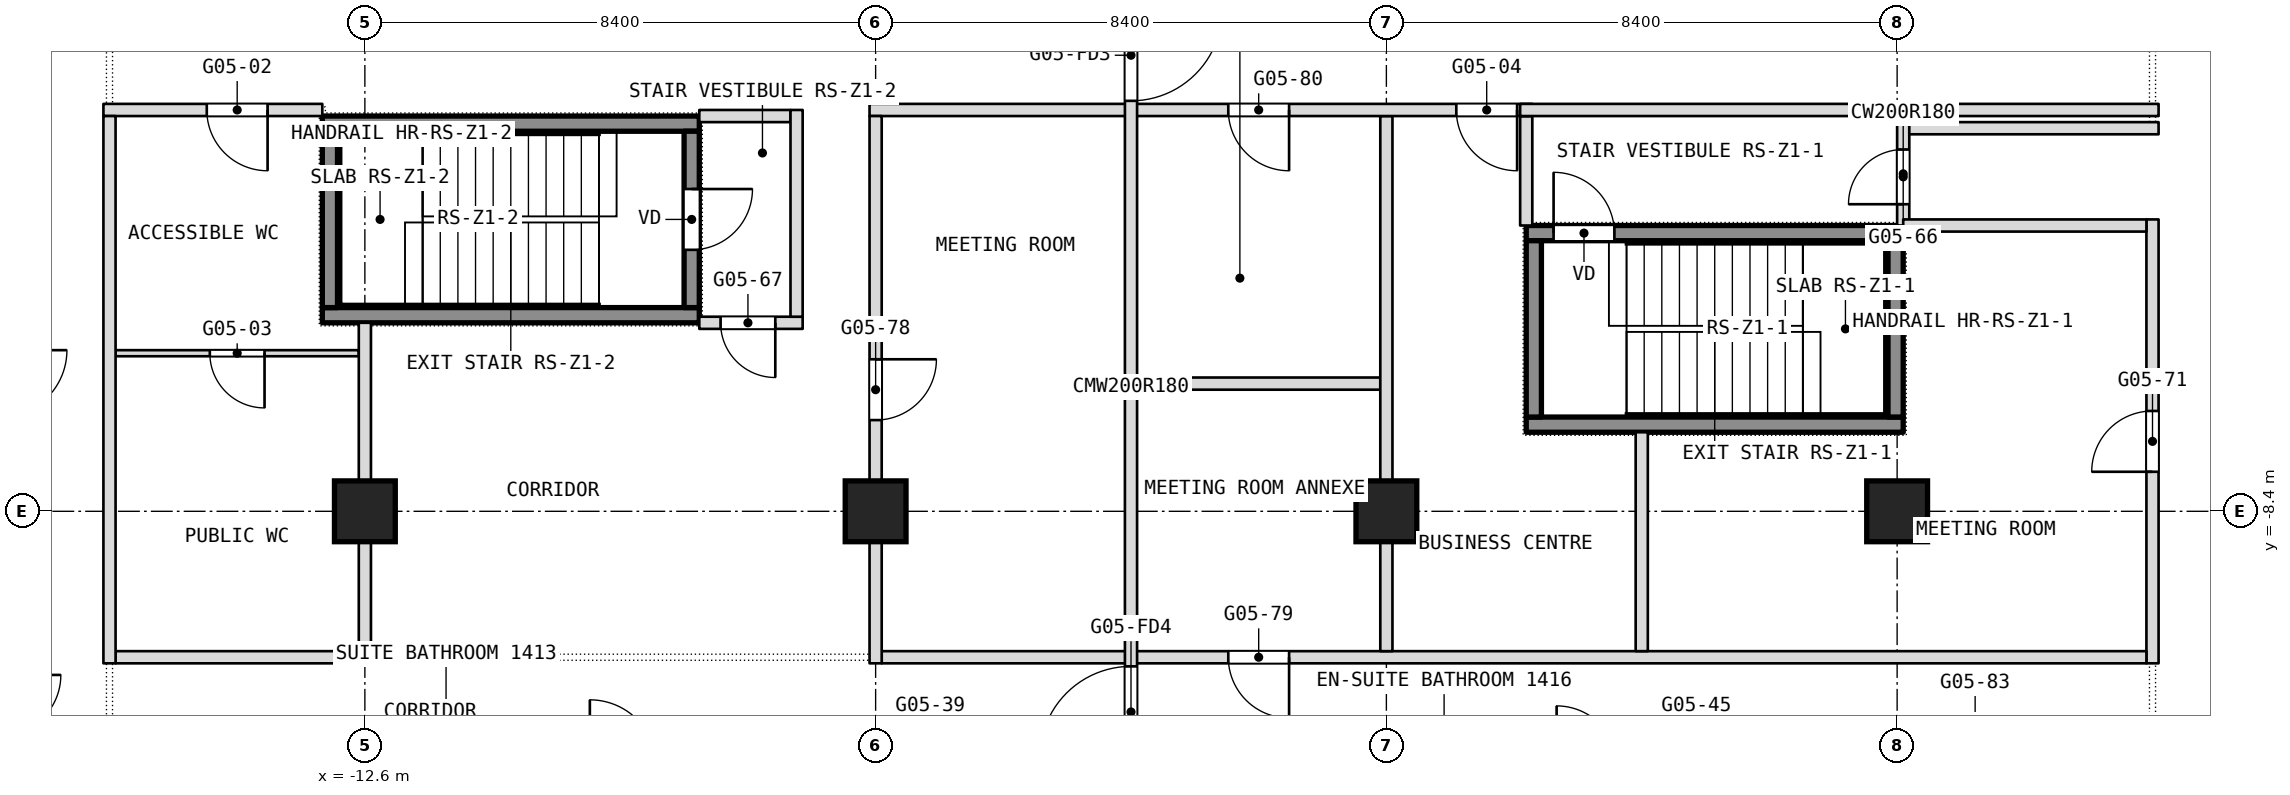
"""IFC4 building model, lengths in metres.
Left out: names, types, materials, properties, quantities, classifications, styles, units other than length and angle.
Written with IfcOpenShell. Run it as: python <this file> out.ifc"""

import sys

from ifc_helpers import new_model, si_unit, direction, frame, frame_2d, origin, origin_2d, place, context, subcontext, project, spatial, rectangle, extrude, element, fill, save


model = new_model("IFC4")
c1 = context("Model", 3, precision=1e-05, world=origin(), true_north=direction((0.0, 1.0)))
c2 = subcontext(c1, "Body", "Model", "MODEL_VIEW")
j1 = project(units=[si_unit("LENGTHUNIT", "METRE"), si_unit("PLANEANGLEUNIT", "RADIAN")], contexts=[c1])
p1 = place(None, origin())
s1 = spatial("IfcSite", under=j1, at=p1, CompositionType="ELEMENT")
p2 = place(p1, origin())
s2 = spatial("IfcBuilding", under=s1, at=p2, CompositionType="ELEMENT")
p3 = place(p2, frame((0.0, 0.0, 65.3)))
s3 = spatial("IfcBuildingStorey", under=s2, at=p3, CompositionType="ELEMENT", Elevation=65.3)
for number, where, z_axis, x_axis in (
    (1, (-12.6, -8.4, 0.0), (0.0, 0.0, 1.0), (1.0, 0.0, 0.0)),
    (2, (-4.2, -8.4, 0.0), (0.0, 0.0, 1.0), (1.0, 0.0, 0.0)),
    (3, (4.2, -8.4, 0.0), (0.0, 0.0, 1.0), (1.0, 0.0, 0.0)),
    (4, (12.6, -8.4, 0.0), (0.0, 0.0, 1.0), (1.0, 0.0, 0.0)),
):
    element("IfcColumn", number, at=place(p3, frame(where, z_axis=z_axis, x_axis=x_axis)), inside=s3, PredefinedType="COLUMN", context=c2, shape_type="SweptSolid", body=[
        extrude(rectangle(XDim=1.0, YDim=1.0, at=origin_2d()), origin(), (0.0, 0.0, 1.0), 3.6),
    ])
p4 = place(p3, frame((16.8, -10.9, 0.0), z_axis=(0.0, 0.0, 1.0), x_axis=(0.0, 1.0, 0.0)))
e5 = element("IfcWall", 5, at=p4, inside=s3, PredefinedType="PARTITIONING", context=c2, shape_type="SweptSolid", body=[
    extrude(rectangle(XDim=7.3, YDim=0.2, at=frame_2d((3.65, 0.0))), origin(), (0.0, 0.0, 1.0), 3.34),
])
p5 = place(p4, frame((3.15, 0.0, 0.0)))
e6 = element("IfcOpeningElement", 6, at=p5, cuts=e5, PredefinedType="OPENING", context=c2, shape_type="SweptSolid", body=[
    extrude(rectangle(XDim=1.0, YDim=2.1, at=frame_2d((0.5, 1.05))), frame((0.0, 0.1, 0.0), z_axis=(0.0, -1.0, 0.0), x_axis=(1.0, 0.0, 0.0)), (0.0, 0.0, 1.0), 0.2),
])
p6 = place(p3, frame((12.7, -3.7, 0.0), z_axis=(0.0, 0.0, 1.0), x_axis=(0.0, 1.0, 0.0)))
e7 = element("IfcWall", 7, at=p6, inside=s3, PredefinedType="PARTITIONING", context=c2, shape_type="SweptSolid", body=[
    extrude(rectangle(XDim=1.7, YDim=0.2, at=frame_2d((0.85, 0.0))), origin(), (0.0, 0.0, 1.0), 3.34),
])
p7 = place(p6, frame((0.35, 0.0, 0.0)))
e8 = element("IfcOpeningElement", 8, at=p7, cuts=e7, PredefinedType="OPENING", context=c2, shape_type="SweptSolid", body=[
    extrude(rectangle(XDim=0.9, YDim=2.1, at=frame_2d((0.45, 1.05))), frame((0.0, 0.1, 0.0), z_axis=(0.0, -1.0, 0.0), x_axis=(1.0, 0.0, 0.0)), (0.0, 0.0, 1.0), 0.2),
])
p8 = place(p3, frame((-16.7, -10.8, 0.0), z_axis=(0.0, 0.0, 1.0), x_axis=(1.0, 0.0, 0.0)))
e9 = element("IfcWall", 9, at=p8, inside=s3, PredefinedType="PARTITIONING", context=c2, shape_type="SweptSolid", body=[
    extrude(rectangle(XDim=4.0, YDim=0.2, at=frame_2d((2.0, 0.0))), origin(), (0.0, 0.0, 1.0), 3.34),
])
p9 = place(p3, frame((-4.1, -10.8, 0.0), z_axis=(0.0, 0.0, 1.0), x_axis=(1.0, 0.0, 0.0)))
e10 = element("IfcWall", 10, at=p9, inside=s3, PredefinedType="PARTITIONING", context=c2, shape_type="SweptSolid", body=[
    extrude(rectangle(XDim=20.8, YDim=0.2, at=frame_2d((10.4, 0.0))), origin(), (0.0, 0.0, 1.0), 3.34),
])
p10 = place(p9, frame((5.7, 0.0, 0.0)))
e11 = element("IfcOpeningElement", 11, at=p10, cuts=e10, PredefinedType="OPENING", context=c2, shape_type="SweptSolid", body=[
    extrude(rectangle(XDim=1.0, YDim=2.1, at=frame_2d((0.5, 1.05))), frame((0.0, 0.1, 0.0), z_axis=(0.0, -1.0, 0.0), x_axis=(1.0, 0.0, 0.0)), (0.0, 0.0, 1.0), 0.2),
])
p11 = place(p3, frame((8.4, -10.7, 0.0), z_axis=(0.0, 0.0, 1.0), x_axis=(0.0, 1.0, 0.0)))
e12 = element("IfcWall", 12, at=p11, inside=s3, PredefinedType="PARTITIONING", context=c2, shape_type="SweptSolid", body=[
    extrude(rectangle(XDim=3.6, YDim=0.2, at=frame_2d((1.8, 0.0))), origin(), (0.0, 0.0, 1.0), 3.34),
])
p12 = place(p3, frame((6.5, -3.7, 0.0), z_axis=(0.0, 0.0, 1.0), x_axis=(0.0, 1.0, 0.0)))
e13 = element("IfcWall", 13, at=p12, inside=s3, PredefinedType="PARTITIONING", context=c2, shape_type="SweptSolid", body=[
    extrude(rectangle(XDim=1.8, YDim=0.2, at=frame_2d((0.9, 0.0))), origin(), (0.0, 0.0, 1.0), 3.34),
])
p13 = place(p3, frame((0.1, -6.3, 0.0), z_axis=(0.0, 0.0, 1.0), x_axis=(1.0, 0.0, 0.0)))
e14 = element("IfcWall", 14, at=p13, inside=s3, PredefinedType="PARTITIONING", context=c2, shape_type="SweptSolid", body=[
    extrude(rectangle(XDim=4.0, YDim=0.2, at=frame_2d((2.0, 0.0))), origin(), (0.0, 0.0, 1.0), 3.34),
])
p14 = place(p3, frame((-16.7, -5.8, 0.0), z_axis=(0.0, 0.0, 1.0), x_axis=(1.0, 0.0, 0.0)))
e15 = element("IfcWall", 15, at=p14, inside=s3, PredefinedType="PARTITIONING", context=c2, shape_type="SweptSolid", body=[
    extrude(rectangle(XDim=4.0, YDim=0.1, at=frame_2d((2.0, 0.0))), origin(), (0.0, 0.0, 1.0), 3.34),
])
p15 = place(p14, frame((1.55, 0.0, 0.0)))
e16 = element("IfcOpeningElement", 16, at=p15, cuts=e15, PredefinedType="OPENING", context=c2, shape_type="SweptSolid", body=[
    extrude(rectangle(XDim=0.9, YDim=2.1, at=frame_2d((0.45, 1.05))), frame((0.0, 0.05, 0.0), z_axis=(0.0, -1.0, 0.0), x_axis=(1.0, 0.0, 0.0)), (0.0, 0.0, 1.0), 0.1),
])
p16 = place(p3, frame((-7.1, -5.3, 0.0), z_axis=(0.0, 0.0, 1.0), x_axis=(1.0, 0.0, 0.0)))
e17 = element("IfcWall", 17, at=p16, inside=s3, PredefinedType="PARTITIONING", context=c2, shape_type="SweptSolid", body=[
    extrude(rectangle(XDim=1.7, YDim=0.2, at=frame_2d((0.85, 0.0))), origin(), (0.0, 0.0, 1.0), 3.34),
])
p17 = place(p16, frame((0.35, 0.0, 0.0)))
e18 = element("IfcOpeningElement", 18, at=p17, cuts=e17, PredefinedType="OPENING", context=c2, shape_type="SweptSolid", body=[
    extrude(rectangle(XDim=0.9, YDim=2.1, at=frame_2d((0.45, 1.05))), frame((0.0, 0.1, 0.0), z_axis=(0.0, -1.0, 0.0), x_axis=(1.0, 0.0, 0.0)), (0.0, 0.0, 1.0), 0.2),
])
p18 = place(p3, frame((4.2, -10.7, 0.0), z_axis=(0.0, 0.0, 1.0), x_axis=(0.0, 1.0, 0.0)))
e19 = element("IfcWall", 19, at=p18, inside=s3, PredefinedType="PARTITIONING", context=c2, shape_type="SweptSolid", body=[
    extrude(rectangle(XDim=8.8, YDim=0.2, at=frame_2d((4.4, 0.0))), origin(), (0.0, 0.0, 1.0), 3.34),
])
p19 = place(p3, frame((12.7, -3.7, 0.0), z_axis=(0.0, 0.0, 1.0), x_axis=(1.0, 0.0, 0.0)))
e20 = element("IfcWall", 20, at=p19, inside=s3, PredefinedType="PARTITIONING", context=c2, shape_type="SweptSolid", body=[
    extrude(rectangle(XDim=4.0, YDim=0.2, at=frame_2d((2.0, 0.0))), origin(), (0.0, 0.0, 1.0), 3.34),
])
p20 = place(p3, frame((12.8, -2.1, 0.0), z_axis=(0.0, 0.0, 1.0), x_axis=(1.0, 0.0, 0.0)))
e21 = element("IfcWall", 21, at=p20, inside=s3, PredefinedType="PARTITIONING", context=c2, shape_type="SweptSolid", body=[
    extrude(rectangle(XDim=4.1, YDim=0.2, at=frame_2d((2.05, 0.0))), origin(), (0.0, 0.0, 1.0), 3.34),
])
p21 = place(p3, frame((-7.1, -1.9, 0.0), z_axis=(0.0, 0.0, 1.0), x_axis=(1.0, 0.0, 0.0)))
e22 = element("IfcWall", 22, at=p21, inside=s3, PredefinedType="PARTITIONING", context=c2, shape_type="SweptSolid", body=[
    extrude(rectangle(XDim=1.5, YDim=0.2, at=frame_2d((0.75, 0.0))), origin(), (0.0, 0.0, 1.0), 3.34),
])
p22 = place(p3, frame((-16.9, -1.8, 0.0), z_axis=(0.0, 0.0, 1.0), x_axis=(1.0, 0.0, 0.0)))
e23 = element("IfcWall", 23, at=p22, inside=s3, PredefinedType="PARTITIONING", context=c2, shape_type="SweptSolid", body=[
    extrude(rectangle(XDim=3.6, YDim=0.2, at=frame_2d((1.8, 0.0))), origin(), (0.0, 0.0, 1.0), 3.34),
])
p23 = place(p22, frame((1.7, 0.0, 0.0)))
e24 = element("IfcOpeningElement", 24, at=p23, cuts=e23, PredefinedType="OPENING", context=c2, shape_type="SweptSolid", body=[
    extrude(rectangle(XDim=1.0, YDim=2.1, at=frame_2d((0.5, 1.05))), frame((0.0, 0.1, 0.0), z_axis=(0.0, -1.0, 0.0), x_axis=(1.0, 0.0, 0.0)), (0.0, 0.0, 1.0), 0.2),
])
p24 = place(p3, frame((-4.3, -1.8, 0.0), z_axis=(0.0, 0.0, 1.0), x_axis=(1.0, 0.0, 0.0)))
e25 = element("IfcWall", 25, at=p24, inside=s3, PredefinedType="PARTITIONING", context=c2, shape_type="SweptSolid", body=[
    extrude(rectangle(XDim=10.9, YDim=0.2, at=frame_2d((5.45, 0.0))), origin(), (0.0, 0.0, 1.0), 3.34),
])
p25 = place(p24, frame((9.65, 0.0, 0.0)))
e26 = element("IfcOpeningElement", 26, at=p25, cuts=e25, PredefinedType="OPENING", context=c2, shape_type="SweptSolid", body=[
    extrude(rectangle(XDim=1.0, YDim=2.1, at=frame_2d((0.5, 1.05))), frame((0.0, 0.1, 0.0), z_axis=(0.0, -1.0, 0.0), x_axis=(1.0, 0.0, 0.0)), (0.0, 0.0, 1.0), 0.2),
])
p26 = place(p24, frame((5.9, 0.0, 0.0)))
e27 = element("IfcOpeningElement", 27, at=p26, cuts=e25, PredefinedType="OPENING", context=c2, shape_type="SweptSolid", body=[
    extrude(rectangle(XDim=1.0, YDim=2.1, at=frame_2d((0.5, 1.05))), frame((0.0, 0.1, 0.0), z_axis=(0.0, -1.0, 0.0), x_axis=(1.0, 0.0, 0.0)), (0.0, 0.0, 1.0), 0.2),
])
p27 = place(p3, frame((6.4, -1.8, 0.0), z_axis=(0.0, 0.0, 1.0), x_axis=(1.0, 0.0, 0.0)))
e28 = element("IfcWall", 28, at=p27, inside=s3, PredefinedType="PARTITIONING", context=c2, shape_type="SweptSolid", body=[
    extrude(rectangle(XDim=10.5, YDim=0.2, at=frame_2d((5.25, 0.0))), origin(), (0.0, 0.0, 1.0), 3.34),
])
p28 = place(p3, frame((0.0, -12.7, 0.0), z_axis=(0.0, 0.0, 1.0), x_axis=(0.0, 1.0, 0.0)))
e29 = element("IfcWall", 29, at=p28, inside=s3, PredefinedType="PARTITIONING", context=c2, shape_type="SweptSolid", body=[
    extrude(rectangle(XDim=12.7, YDim=0.2, at=frame_2d((6.35, 0.0))), origin(), (0.0, 0.0, 1.0), 3.34),
])
p29 = place(p28, frame((11.05, 0.0, 0.0)))
e30 = element("IfcOpeningElement", 30, at=p29, cuts=e29, PredefinedType="OPENING", context=c2, shape_type="SweptSolid", body=[
    extrude(rectangle(XDim=1.5, YDim=2.1, at=frame_2d((0.75, 1.05))), frame((0.0, 0.1, 0.0), z_axis=(0.0, -1.0, 0.0), x_axis=(1.0, 0.0, 0.0)), (0.0, 0.0, 1.0), 0.2),
])
p30 = place(p28, frame((0.25, 0.0, 0.0)))
e31 = element("IfcOpeningElement", 31, at=p30, cuts=e29, PredefinedType="OPENING", context=c2, shape_type="SweptSolid", body=[
    extrude(rectangle(XDim=1.5, YDim=2.1, at=frame_2d((0.75, 1.05))), frame((0.0, 0.1, 0.0), z_axis=(0.0, -1.0, 0.0), x_axis=(1.0, 0.0, 0.0)), (0.0, 0.0, 1.0), 0.2),
])
p31 = place(p3, frame((-4.2, -10.9, 0.0), z_axis=(0.0, 0.0, 1.0), x_axis=(0.0, 1.0, 0.0)))
e32 = element("IfcWall", 32, at=p31, inside=s3, PredefinedType="PARTITIONING", context=c2, shape_type="SweptSolid", body=[
    extrude(rectangle(XDim=9.0, YDim=0.2, at=frame_2d((4.5, 0.0))), origin(), (0.0, 0.0, 1.0), 3.34),
])
p32 = place(p31, frame((4.0, 0.0, 0.0)))
e33 = element("IfcOpeningElement", 33, at=p32, cuts=e32, PredefinedType="OPENING", context=c2, shape_type="SweptSolid", body=[
    extrude(rectangle(XDim=1.0, YDim=2.1, at=frame_2d((0.5, 1.05))), frame((0.0, 0.1, 0.0), z_axis=(0.0, -1.0, 0.0), x_axis=(1.0, 0.0, 0.0)), (0.0, 0.0, 1.0), 0.2),
])
p33 = place(p3, frame((-5.5, -5.2, 0.0), z_axis=(0.0, 0.0, 1.0), x_axis=(0.0, 1.0, 0.0)))
e34 = element("IfcWall", 34, at=p33, inside=s3, PredefinedType="PARTITIONING", context=c2, shape_type="SweptSolid", body=[
    extrude(rectangle(XDim=3.4, YDim=0.2, at=frame_2d((1.7, 0.0))), origin(), (0.0, 0.0, 1.0), 3.34),
])
p34 = place(p3, frame((-12.6, -10.9, 0.0), z_axis=(0.0, 0.0, 1.0), x_axis=(0.0, 1.0, 0.0)))
e35 = element("IfcWall", 35, at=p34, inside=s3, PredefinedType="PARTITIONING", context=c2, shape_type="SweptSolid", body=[
    extrude(rectangle(XDim=5.6, YDim=0.2, at=frame_2d((2.8, 0.0))), origin(), (0.0, 0.0, 1.0), 3.34),
])
p35 = place(p3, frame((-16.8, -10.9, 0.0), z_axis=(0.0, 0.0, 1.0), x_axis=(0.0, 1.0, 0.0)))
e36 = element("IfcWall", 36, at=p35, inside=s3, PredefinedType="PARTITIONING", context=c2, shape_type="SweptSolid", body=[
    extrude(rectangle(XDim=9.0, YDim=0.2, at=frame_2d((4.5, 0.0))), origin(), (0.0, 0.0, 1.0), 3.34),
])
p36 = place(p3, frame((6.5, -6.975, 0.1), z_axis=(0.0, 0.0, 1.0), x_axis=(1.0, 0.0, 0.0)))
e37 = element("IfcWall", 37, at=p36, inside=s3, PredefinedType="SHEAR", context=c2, shape_type="SweptSolid", body=[
    extrude(rectangle(XDim=6.2, YDim=0.25, at=frame_2d((3.1, 0.0))), origin(), (0.0, 0.0, 1.0), 3.6),
])
p37 = place(p3, frame((6.5, -3.825, 0.1), z_axis=(0.0, 0.0, 1.0), x_axis=(1.0, 0.0, 0.0)))
e38 = element("IfcWall", 38, at=p37, inside=s3, PredefinedType="SHEAR", context=c2, shape_type="SweptSolid", body=[
    extrude(rectangle(XDim=6.2, YDim=0.25, at=frame_2d((3.1, 0.0))), origin(), (0.0, 0.0, 1.0), 3.6),
])
p38 = place(p37, frame((0.45, 0.0, 0.0)))
e39 = element("IfcOpeningElement", 39, at=p38, cuts=e38, PredefinedType="OPENING", context=c2, shape_type="SweptSolid", body=[
    extrude(rectangle(XDim=1.0, YDim=2.1, at=frame_2d((0.5, 1.05))), frame((0.0, 0.125, 0.0), z_axis=(0.0, -1.0, 0.0), x_axis=(1.0, 0.0, 0.0)), (0.0, 0.0, 1.0), 0.25),
])
for number, where, z_axis, x_axis in (
    (40, (6.625, -6.85, 0.1), (0.0, 0.0, 1.0), (0.0, 1.0, 0.0)),
    (41, (12.575, -6.85, 0.1), (0.0, 0.0, 1.0), (0.0, 1.0, 0.0)),
):
    element("IfcWall", number, at=place(p3, frame(where, z_axis=z_axis, x_axis=x_axis)), inside=s3, PredefinedType="SHEAR", context=c2, shape_type="SweptSolid", body=[
        extrude(rectangle(XDim=2.9, YDim=0.25, at=frame_2d((1.45, 0.0))), origin(), (0.0, 0.0, 1.0), 3.6),
    ])
for number, where, z_axis, x_axis in (
    (42, (-13.3, -5.175, 0.1), (0.0, 0.0, 1.0), (1.0, 0.0, 0.0)),
    (43, (-13.3, -2.025, 0.1), (0.0, 0.0, 1.0), (1.0, 0.0, 0.0)),
):
    element("IfcWall", number, at=place(p3, frame(where, z_axis=z_axis, x_axis=x_axis)), inside=s3, PredefinedType="SHEAR", context=c2, shape_type="SweptSolid", body=[
        extrude(rectangle(XDim=6.2, YDim=0.25, at=frame_2d((3.1, 0.0))), origin(), (0.0, 0.0, 1.0), 3.6),
    ])
p39 = place(p3, frame((-13.175, -5.05, 0.1), z_axis=(0.0, 0.0, 1.0), x_axis=(0.0, 1.0, 0.0)))
e44 = element("IfcWall", 44, at=p39, inside=s3, PredefinedType="SHEAR", context=c2, shape_type="SweptSolid", body=[
    extrude(rectangle(XDim=2.9, YDim=0.25, at=frame_2d((1.45, 0.0))), origin(), (0.0, 0.0, 1.0), 3.6),
])
p40 = place(p3, frame((-7.225, -5.05, 0.1), z_axis=(0.0, 0.0, 1.0), x_axis=(0.0, 1.0, 0.0)))
e45 = element("IfcWall", 45, at=p40, inside=s3, PredefinedType="SHEAR", context=c2, shape_type="SweptSolid", body=[
    extrude(rectangle(XDim=2.9, YDim=0.25, at=frame_2d((1.45, 0.0))), origin(), (0.0, 0.0, 1.0), 3.6),
])
p41 = place(p40, frame((0.95, 0.0, 0.0)))
e46 = element("IfcOpeningElement", 46, at=p41, cuts=e45, PredefinedType="OPENING", context=c2, shape_type="SweptSolid", body=[
    extrude(rectangle(XDim=1.0, YDim=2.1, at=frame_2d((0.5, 1.05))), frame((0.0, 0.125, 0.0), z_axis=(0.0, -1.0, 0.0), x_axis=(1.0, 0.0, 0.0)), (0.0, 0.0, 1.0), 0.25),
])
p42 = place(p5, origin())
e47 = element("IfcDoor", 47, at=p42, inside=s3, OperationType="SINGLE_SWING_LEFT", PredefinedType="DOOR", context=c2, shape_type="SweptSolid", body=[
    extrude(rectangle(XDim=1.0, YDim=2.1, at=frame_2d((0.5, 1.05))), frame((0.0, 0.025, 0.0), z_axis=(0.0, -1.0, 0.0), x_axis=(1.0, 0.0, 0.0)), (0.0, 0.0, 1.0), 0.05),
])
fill(e6, e47)
p43 = place(p7, origin())
e48 = element("IfcDoor", 48, at=p43, inside=s3, OperationType="SINGLE_SWING_LEFT", PredefinedType="DOOR", context=c2, shape_type="SweptSolid", body=[
    extrude(rectangle(XDim=0.9, YDim=2.1, at=frame_2d((0.45, 1.05))), frame((0.0, 0.025, 0.0), z_axis=(0.0, -1.0, 0.0), x_axis=(1.0, 0.0, 0.0)), (0.0, 0.0, 1.0), 0.05),
])
fill(e8, e48)
p44 = place(p10, origin())
e49 = element("IfcDoor", 49, at=p44, inside=s3, OperationType="SINGLE_SWING_LEFT", PredefinedType="DOOR", context=c2, shape_type="SweptSolid", body=[
    extrude(rectangle(XDim=1.0, YDim=2.1, at=frame_2d((0.5, 1.05))), frame((0.0, 0.025, 0.0), z_axis=(0.0, -1.0, 0.0), x_axis=(1.0, 0.0, 0.0)), (0.0, 0.0, 1.0), 0.05),
])
fill(e11, e49)
p45 = place(p15, origin())
e50 = element("IfcDoor", 50, at=p45, inside=s3, OperationType="SINGLE_SWING_LEFT", PredefinedType="DOOR", context=c2, shape_type="SweptSolid", body=[
    extrude(rectangle(XDim=0.9, YDim=2.1, at=frame_2d((0.45, 1.05))), frame((0.0, 0.025, 0.0), z_axis=(0.0, -1.0, 0.0), x_axis=(1.0, 0.0, 0.0)), (0.0, 0.0, 1.0), 0.05),
])
fill(e16, e50)
p46 = place(p17, origin())
e51 = element("IfcDoor", 51, at=p46, inside=s3, OperationType="SINGLE_SWING_RIGHT", PredefinedType="DOOR", context=c2, shape_type="SweptSolid", body=[
    extrude(rectangle(XDim=0.9, YDim=2.1, at=frame_2d((0.45, 1.05))), frame((0.0, 0.025, 0.0), z_axis=(0.0, -1.0, 0.0), x_axis=(1.0, 0.0, 0.0)), (0.0, 0.0, 1.0), 0.05),
])
fill(e18, e51)
p47 = place(p23, origin())
e52 = element("IfcDoor", 52, at=p47, inside=s3, OperationType="SINGLE_SWING_RIGHT", PredefinedType="DOOR", context=c2, shape_type="SweptSolid", body=[
    extrude(rectangle(XDim=1.0, YDim=2.1, at=frame_2d((0.5, 1.05))), frame((0.0, 0.025, 0.0), z_axis=(0.0, -1.0, 0.0), x_axis=(1.0, 0.0, 0.0)), (0.0, 0.0, 1.0), 0.05),
])
fill(e24, e52)
p48 = place(p25, origin())
e53 = element("IfcDoor", 53, at=p48, inside=s3, OperationType="SINGLE_SWING_LEFT", PredefinedType="DOOR", context=c2, shape_type="SweptSolid", body=[
    extrude(rectangle(XDim=1.0, YDim=2.1, at=frame_2d((0.5, 1.05))), frame((0.0, 0.025, 0.0), z_axis=(0.0, -1.0, 0.0), x_axis=(1.0, 0.0, 0.0)), (0.0, 0.0, 1.0), 0.05),
])
fill(e26, e53)
p49 = place(p26, origin())
e54 = element("IfcDoor", 54, at=p49, inside=s3, OperationType="SINGLE_SWING_RIGHT", PredefinedType="DOOR", context=c2, shape_type="SweptSolid", body=[
    extrude(rectangle(XDim=1.0, YDim=2.1, at=frame_2d((0.5, 1.05))), frame((0.0, 0.025, 0.0), z_axis=(0.0, -1.0, 0.0), x_axis=(1.0, 0.0, 0.0)), (0.0, 0.0, 1.0), 0.05),
])
fill(e27, e54)
p50 = place(p32, origin())
e55 = element("IfcDoor", 55, at=p50, inside=s3, OperationType="SINGLE_SWING_LEFT", PredefinedType="DOOR", context=c2, shape_type="SweptSolid", body=[
    extrude(rectangle(XDim=1.0, YDim=2.1, at=frame_2d((0.5, 1.05))), frame((0.0, 0.025, 0.0), z_axis=(0.0, -1.0, 0.0), x_axis=(1.0, 0.0, 0.0)), (0.0, 0.0, 1.0), 0.05),
])
fill(e33, e55)
p51 = place(p38, origin())
e56 = element("IfcDoor", 56, at=p51, inside=s3, OperationType="SINGLE_SWING_LEFT", PredefinedType="DOOR", context=c2, shape_type="SweptSolid", body=[
    extrude(rectangle(XDim=1.0, YDim=2.1, at=frame_2d((0.5, 1.05))), frame((0.0, 0.025, 0.0), z_axis=(0.0, -1.0, 0.0), x_axis=(1.0, 0.0, 0.0)), (0.0, 0.0, 1.0), 0.05),
])
fill(e39, e56)
p52 = place(p41, origin())
e57 = element("IfcDoor", 57, at=p52, inside=s3, OperationType="SINGLE_SWING_LEFT", PredefinedType="DOOR", context=c2, shape_type="SweptSolid", body=[
    extrude(rectangle(XDim=1.0, YDim=2.1, at=frame_2d((0.5, 1.05))), frame((0.0, 0.025, 0.0), z_axis=(0.0, -1.0, 0.0), x_axis=(1.0, 0.0, 0.0)), (0.0, 0.0, 1.0), 0.05),
])
fill(e46, e57)
p53 = place(p29, origin())
e58 = element("IfcDoor", 58, at=p53, inside=s3, OperationType="DOUBLE_DOOR_DOUBLE_SWING", PredefinedType="DOOR", context=c2, shape_type="SweptSolid", body=[
    extrude(rectangle(XDim=1.5, YDim=2.1, at=frame_2d((0.75, 1.05))), frame((0.0, 0.025, 0.0), z_axis=(0.0, -1.0, 0.0), x_axis=(1.0, 0.0, 0.0)), (0.0, 0.0, 1.0), 0.05),
])
fill(e30, e58)
p54 = place(p30, origin())
e59 = element("IfcDoor", 59, at=p54, inside=s3, OperationType="DOUBLE_DOOR_DOUBLE_SWING", PredefinedType="DOOR", context=c2, shape_type="SweptSolid", body=[
    extrude(rectangle(XDim=1.5, YDim=2.1, at=frame_2d((0.75, 1.05))), frame((0.0, 0.025, 0.0), z_axis=(0.0, -1.0, 0.0), x_axis=(1.0, 0.0, 0.0)), (0.0, 0.0, 1.0), 0.05),
])
fill(e31, e59)
save(model, sys.argv[1])
